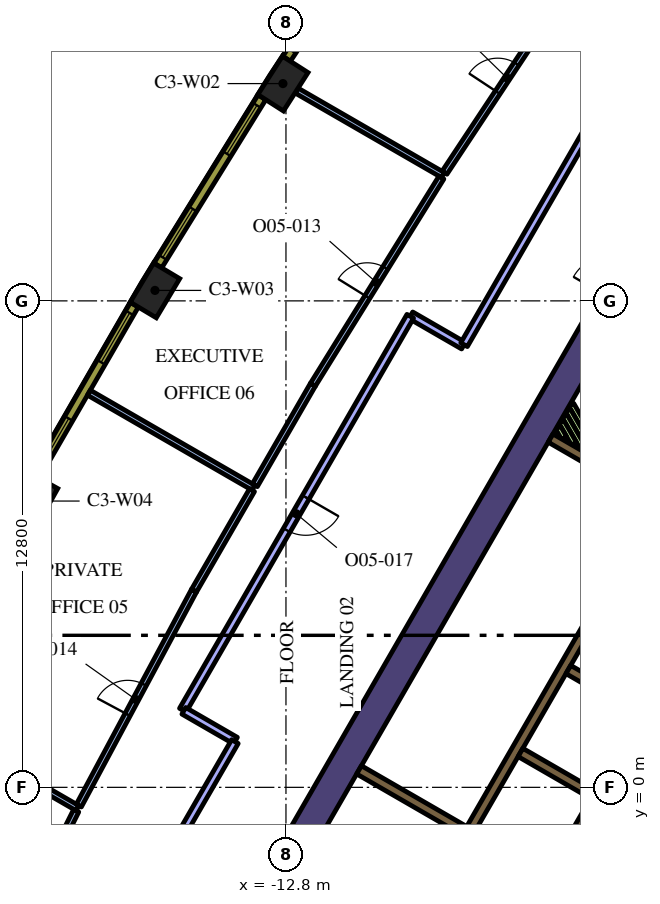
"""IFC4 building model, lengths in metres.
Left out: names, types, materials, properties, quantities, classifications, styles, units other than length and angle.
Written with IfcOpenShell. Run it as: python <this file> out.ifc"""

import sys

from ifc_helpers import new_model, si_unit, direction, frame, frame_2d, origin, origin_2d, place, context, subcontext, project, spatial, rectangle, extrude, element, fill, save


model = new_model("IFC4")
c1 = context("Model", 3, precision=1e-05, world=origin(), true_north=direction((0.0, 1.0)))
c2 = subcontext(c1, "Body", "Model", "MODEL_VIEW")
j1 = project(units=[si_unit("LENGTHUNIT", "METRE"), si_unit("PLANEANGLEUNIT", "RADIAN")], contexts=[c1])
p1 = place(None, origin())
s1 = spatial("IfcSite", under=j1, at=p1, CompositionType="ELEMENT")
p2 = place(p1, origin())
s2 = spatial("IfcBuilding", under=s1, at=p2, CompositionType="ELEMENT")
p3 = place(p2, frame((0.0, 0.0, 192.0)))
s3 = spatial("IfcBuildingStorey", under=s2, at=p3, CompositionType="ELEMENT", Elevation=192.0)
for number, where, z_axis, x_axis in (
    (1, (-12.88, 18.517, 0.0), (0.0, 0.0, 1.0), (-0.539, -0.842, 0.0)),
    (2, (-16.247, 13.075, 0.0), (0.0, 0.0, 1.0), (-0.513, -0.858, 0.0)),
    (3, (-19.447, 7.533, 0.0), (0.0, 0.0, 1.0), (-0.487, -0.874, 0.0)),
):
    element("IfcColumn", number, at=place(p3, frame(where, z_axis=z_axis, x_axis=x_axis)), inside=s3, PredefinedType="COLUMN", context=c2, shape_type="SweptSolid", body=[
        extrude(rectangle(XDim=1.2, YDim=0.8, at=origin_2d()), origin(), (0.0, 0.0, 1.0), 4.2),
    ])
p4 = place(p3, frame((-4.321, 12.616, 0.0), z_axis=(0.0, 0.0, 1.0), x_axis=(-0.500009809857, -0.866019739987, 0.0)))
e4 = element("IfcWall", 4, at=p4, inside=s3, PredefinedType="SOLIDWALL", context=c2, shape_type="SweptSolid", body=[
    extrude(rectangle(XDim=16.695, YDim=0.8, at=frame_2d((8.347, 0.0))), origin(), (0.0, 0.0, 1.0), 4.2),
])
p5 = place(p3, frame((-3.02, 7.419, 0.0), z_axis=(0.0, 0.0, 1.0), x_axis=(-0.500022956343, -0.866012149528, 0.0)))
e5 = element("IfcWall", 5, at=p5, inside=s3, PredefinedType="SOLIDWALL", context=c2, shape_type="SweptSolid", body=[
    extrude(rectangle(XDim=10.08, YDim=0.25, at=frame_2d((5.04, 0.0))), origin(), (0.0, 0.0, 1.0), 4.2),
])
for number, where, z_axis, x_axis in (
    (6, (-5.369, 3.1, 0.0), (0.0, 0.0, 1.0), (0.866, -0.5, 0.0)),
    (7, (-4.724, -0.182, 0.0), (0.0, 0.0, 1.0), (-0.866, 0.5, 0.0)),
):
    element("IfcWall", number, at=place(p3, frame(where, z_axis=z_axis, x_axis=x_axis)), inside=s3, PredefinedType="SOLIDWALL", context=c2, shape_type="SweptSolid", body=[
        extrude(rectangle(XDim=2.2, YDim=0.25, at=frame_2d((1.1, 0.0))), origin(), (0.0, 0.0, 1.0), 4.2),
    ])
p6 = place(p3, frame((-8.106, -1.14, 0.0), z_axis=(0.0, 0.0, 1.0), x_axis=(-0.866008981251, 0.500028443584, 0.0)))
e8 = element("IfcWall", 8, at=p6, inside=s3, PredefinedType="SOLIDWALL", context=c2, shape_type="SweptSolid", body=[
    extrude(rectangle(XDim=3.2, YDim=0.25, at=frame_2d((1.6, 0.0))), origin(), (0.0, 0.0, 1.0), 4.2),
])
p7 = place(p3, frame((-5.837, 9.19, 0.0), z_axis=(0.0, 0.0, 1.0), x_axis=(0.866024298998, -0.500001913541, 0.0)))
e9 = element("IfcWall", 9, at=p7, inside=s3, PredefinedType="SOLIDWALL", context=c2, shape_type="SweptSolid", body=[
    extrude(rectangle(XDim=1.21, YDim=0.25, at=frame_2d((0.605, 0.0))), origin(), (0.0, 0.0, 1.0), 4.2),
])
p8 = place(p3, frame((-5.294, 10.067, 0.0), z_axis=(0.0, 0.0, 1.0), x_axis=(0.500054140411, -0.865994143547, 0.0)))
e10 = element("IfcWall", 10, at=p8, inside=s3, PredefinedType="PARTITIONING", context=c2, shape_type="SweptSolid", body=[
    extrude(rectangle(XDim=1.529, YDim=0.15, at=frame_2d((0.765, 0.0))), origin(), (0.0, 0.0, 1.0), 3.1),
])
p9 = place(p3, frame((-5.381, 9.917, 0.0), z_axis=(0.0, 0.0, 1.0), x_axis=(0.500136970483, -0.865946309396, 0.0)))
e11 = element("IfcWall", 11, at=p9, inside=s3, PredefinedType="PARTITIONING", context=c2, shape_type="SweptSolid", body=[
    extrude(rectangle(XDim=1.359, YDim=0.15, at=frame_2d((0.68, 0.0))), origin(), (0.0, 0.0, 1.0), 3.1),
])
p10 = place(p3, frame((-5.467, 9.767, 0.0), z_axis=(0.0, 0.0, 1.0), x_axis=(0.500168849293, -0.86592789665, 0.0)))
e12 = element("IfcWall", 12, at=p10, inside=s3, PredefinedType="PARTITIONING", context=c2, shape_type="SweptSolid", body=[
    extrude(rectangle(XDim=1.01, YDim=0.15, at=frame_2d((0.505, 0.0))), origin(), (0.0, 0.0, 1.0), 3.1),
])
p11 = place(p3, frame((-5.554, 9.617, 0.0), z_axis=(0.0, 0.0, 1.0), x_axis=(0.500253084543, -0.86587923604, 0.0)))
e13 = element("IfcWall", 13, at=p11, inside=s3, PredefinedType="PARTITIONING", context=c2, shape_type="SweptSolid", body=[
    extrude(rectangle(XDim=0.664, YDim=0.15, at=frame_2d((0.332, 0.0))), origin(), (0.0, 0.0, 1.0), 3.1),
])
p12 = place(p3, frame((-5.64, 9.467, 0.0), z_axis=(0.0, 0.0, 1.0), x_axis=(0.499944387978, -0.86605750902, 0.0)))
e14 = element("IfcWall", 14, at=p12, inside=s3, PredefinedType="PARTITIONING", context=c2, shape_type="SweptSolid", body=[
    extrude(rectangle(XDim=0.317, YDim=0.15, at=frame_2d((0.159, 0.0))), origin(), (0.0, 0.0, 1.0), 3.1),
])
p13 = place(p3, frame((-0.898, 6.194, 0.0), z_axis=(0.0, 0.0, 1.0), x_axis=(-0.499996202215, -0.866027596426, 0.0)))
e15 = element("IfcWall", 15, at=p13, inside=s3, PredefinedType="SOLIDWALL", context=c2, shape_type="SweptSolid", body=[
    extrude(rectangle(XDim=9.83, YDim=0.25, at=frame_2d((4.915, 0.0))), origin(), (0.0, 0.0, 1.0), 4.2),
])
p14 = place(p13, frame((0.585, 0.0, 0.0)))
e16 = element("IfcOpeningElement", 16, at=p14, cuts=e15, PredefinedType="OPENING", context=c2, shape_type="SweptSolid", body=[
    extrude(rectangle(XDim=1.1, YDim=2.1, at=frame_2d((0.55, 1.05))), frame((0.0, 0.135, 0.0), z_axis=(0.0, -1.0, 0.0), x_axis=(1.0, 0.0, 0.0)), (0.0, 0.0, 1.0), 0.27),
])
p15 = place(p13, frame((3.105, 0.0, 0.0)))
e17 = element("IfcOpeningElement", 17, at=p15, cuts=e15, PredefinedType="OPENING", context=c2, shape_type="SweptSolid", body=[
    extrude(rectangle(XDim=1.1, YDim=2.1, at=frame_2d((0.55, 1.05))), frame((0.0, 0.135, 0.0), z_axis=(0.0, -1.0, 0.0), x_axis=(1.0, 0.0, 0.0)), (0.0, 0.0, 1.0), 0.27),
])
p16 = place(p13, frame((5.625, 0.0, 0.0)))
e18 = element("IfcOpeningElement", 18, at=p16, cuts=e15, PredefinedType="OPENING", context=c2, shape_type="SweptSolid", body=[
    extrude(rectangle(XDim=1.1, YDim=2.1, at=frame_2d((0.55, 1.05))), frame((0.0, 0.135, 0.0), z_axis=(0.0, -1.0, 0.0), x_axis=(1.0, 0.0, 0.0)), (0.0, 0.0, 1.0), 0.27),
])
p17 = place(p13, frame((8.145, 0.0, 0.0)))
e19 = element("IfcOpeningElement", 19, at=p17, cuts=e15, PredefinedType="OPENING", context=c2, shape_type="SweptSolid", body=[
    extrude(rectangle(XDim=1.1, YDim=2.1, at=frame_2d((0.55, 1.05))), frame((0.0, 0.135, 0.0), z_axis=(0.0, -1.0, 0.0), x_axis=(1.0, 0.0, 0.0)), (0.0, 0.0, 1.0), 0.27),
])
p18 = place(p3, frame((-8.669, 16.11, 0.0), z_axis=(0.0, 0.0, 1.0), x_axis=(-0.866019272134, 0.50001062018, 0.0)))
e20 = element("IfcWall", 20, at=p18, inside=s3, PredefinedType="PARTITIONING", context=c2, shape_type="SweptSolid", body=[
    extrude(rectangle(XDim=4.449, YDim=0.15, at=frame_2d((2.225, 0.0))), origin(), (0.0, 0.0, 1.0), 3.1),
])
p19 = place(p3, frame((-8.627, 16.173, 0.0), z_axis=(0.0, 0.0, 1.0), x_axis=(0.551896352686, 0.833912714792, 0.0)))
e21 = element("IfcWall", 21, at=p19, inside=s3, PredefinedType="PARTITIONING", context=c2, shape_type="SweptSolid", body=[
    extrude(rectangle(XDim=5.934, YDim=0.15, at=frame_2d((2.967, 0.0))), origin(), (0.0, 0.0, 1.0), 3.1),
])
p20 = place(p19, frame((2.534, 0.0, 0.0)))
e22 = element("IfcOpeningElement", 22, at=p20, cuts=e21, PredefinedType="OPENING", context=c2, shape_type="SweptSolid", body=[
    extrude(rectangle(XDim=0.9, YDim=2.1, at=frame_2d((0.45, 1.05))), frame((0.0, 0.085, 0.0), z_axis=(0.0, -1.0, 0.0), x_axis=(1.0, 0.0, 0.0)), (0.0, 0.0, 1.0), 0.17),
])
p21 = place(p3, frame((-13.656, 7.884, 0.0), z_axis=(0.0, 0.0, 1.0), x_axis=(-0.866022959057, 0.500004234368, 0.0)))
e23 = element("IfcWall", 23, at=p21, inside=s3, PredefinedType="PARTITIONING", context=c2, shape_type="SweptSolid", body=[
    extrude(rectangle(XDim=5.0, YDim=0.15, at=frame_2d((2.5, 0.0))), origin(), (0.0, 0.0, 1.0), 3.1),
])
p22 = place(p3, frame((-12.093, 10.591, 0.0), z_axis=(0.0, 0.0, 1.0), x_axis=(0.527179193015, 0.849754140003, 0.0)))
e24 = element("IfcWall", 24, at=p22, inside=s3, PredefinedType="PARTITIONING", context=c2, shape_type="SweptSolid", body=[
    extrude(rectangle(XDim=6.42, YDim=0.15, at=frame_2d((3.21, 0.0))), origin(), (0.0, 0.0, 1.0), 3.1),
])
p23 = place(p22, frame((2.719, 0.0, 0.0)))
e25 = element("IfcOpeningElement", 25, at=p23, cuts=e24, PredefinedType="OPENING", context=c2, shape_type="SweptSolid", body=[
    extrude(rectangle(XDim=0.9, YDim=2.1, at=frame_2d((0.45, 1.05))), frame((0.0, 0.085, 0.0), z_axis=(0.0, -1.0, 0.0), x_axis=(1.0, 0.0, 0.0)), (0.0, 0.0, 1.0), 0.17),
])
p24 = place(p3, frame((-12.093, 10.591, 0.0), z_axis=(0.0, 0.0, 1.0), x_axis=(-0.499994921628, -0.866028335764, 0.0)))
e26 = element("IfcWall", 26, at=p24, inside=s3, PredefinedType="PARTITIONING", context=c2, shape_type="SweptSolid", body=[
    extrude(rectangle(XDim=3.051, YDim=0.15, at=frame_2d((1.525, 0.0))), origin(), (0.0, 0.0, 1.0), 3.1),
])
p25 = place(p3, frame((-18.286, -0.547, 0.0), z_axis=(0.0, 0.0, 1.0), x_axis=(-0.866043033223, 0.499969463673, 0.0)))
e27 = element("IfcWall", 27, at=p25, inside=s3, PredefinedType="PARTITIONING", context=c2, shape_type="SweptSolid", body=[
    extrude(rectangle(XDim=4.449, YDim=0.15, at=frame_2d((2.225, 0.0))), origin(), (0.0, 0.0, 1.0), 3.1),
])
p26 = place(p3, frame((-13.693, 7.819, 0.0), z_axis=(0.0, 0.0, 1.0), x_axis=(-0.500054937028, -0.865993683553, 0.0)))
e28 = element("IfcWall", 28, at=p26, inside=s3, PredefinedType="PARTITIONING", context=c2, shape_type="SweptSolid", body=[
    extrude(rectangle(XDim=3.051, YDim=0.15, at=frame_2d((1.525, 0.0))), origin(), (0.0, 0.0, 1.0), 3.1),
])
p27 = place(p3, frame((-18.251, -0.481, 0.0), z_axis=(0.0, 0.0, 1.0), x_axis=(0.472318506028, 0.881427948765, 0.0)))
e29 = element("IfcWall", 29, at=p27, inside=s3, PredefinedType="PARTITIONING", context=c2, shape_type="SweptSolid", body=[
    extrude(rectangle(XDim=6.419, YDim=0.15, at=frame_2d((3.21, 0.0))), origin(), (0.0, 0.0, 1.0), 3.1),
])
p28 = place(p27, frame((2.719, 0.0, 0.0)))
e30 = element("IfcOpeningElement", 30, at=p28, cuts=e29, PredefinedType="OPENING", context=c2, shape_type="SweptSolid", body=[
    extrude(rectangle(XDim=0.9, YDim=2.1, at=frame_2d((0.45, 1.05))), frame((0.0, 0.085, 0.0), z_axis=(0.0, -1.0, 0.0), x_axis=(1.0, 0.0, 0.0)), (0.0, 0.0, 1.0), 0.17),
])
p29 = place(p3, frame((-20.968, -5.925, 0.0), z_axis=(0.0, 0.0, 1.0), x_axis=(0.446258864447, 0.894903919928, 0.0)))
e31 = element("IfcWall", 31, at=p29, inside=s3, PredefinedType="PARTITIONING", context=c2, shape_type="SweptSolid", body=[
    extrude(rectangle(XDim=5.934, YDim=0.15, at=frame_2d((2.967, 0.0))), origin(), (0.0, 0.0, 1.0), 3.1),
])
p30 = place(p29, frame((2.534, 0.0, 0.0)))
e32 = element("IfcOpeningElement", 32, at=p30, cuts=e31, PredefinedType="OPENING", context=c2, shape_type="SweptSolid", body=[
    extrude(rectangle(XDim=0.9, YDim=2.1, at=frame_2d((0.45, 1.05))), frame((0.0, 0.085, 0.0), z_axis=(0.0, -1.0, 0.0), x_axis=(1.0, 0.0, 0.0)), (0.0, 0.0, 1.0), 0.17),
])
p31 = place(p3, frame((-8.128, 11.621, 0.0), z_axis=(0.0, 0.0, 1.0), x_axis=(-0.866028054938, 0.499995408039, 0.0)))
e33 = element("IfcWall", 33, at=p31, inside=s3, PredefinedType="PARTITIONING", context=c2, shape_type="SweptSolid", body=[
    extrude(rectangle(XDim=1.6, YDim=0.2, at=frame_2d((0.8, 0.0))), origin(), (0.0, 0.0, 1.0), 3.1),
])
p32 = place(p3, frame((-9.529, 12.395, 0.0), z_axis=(0.0, 0.0, 1.0), x_axis=(-0.500001991949, -0.866024253729, 0.0)))
e34 = element("IfcWall", 34, at=p32, inside=s3, PredefinedType="PARTITIONING", context=c2, shape_type="SweptSolid", body=[
    extrude(rectangle(XDim=11.97, YDim=0.2, at=frame_2d((5.985, 0.0))), origin(), (0.0, 0.0, 1.0), 3.1),
])
p33 = place(p32, frame((5.5, 0.0, 0.0)))
e35 = element("IfcOpeningElement", 35, at=p33, cuts=e34, PredefinedType="OPENING", context=c2, shape_type="SweptSolid", body=[
    extrude(rectangle(XDim=1.0, YDim=2.1, at=frame_2d((0.5, 1.05))), frame((0.0, 0.11, 0.0), z_axis=(0.0, -1.0, 0.0), x_axis=(1.0, 0.0, 0.0)), (0.0, 0.0, 1.0), 0.22),
])
p34 = place(p3, frame((-15.488, 2.014, 0.0), z_axis=(0.0, 0.0, 1.0), x_axis=(0.865975818674, -0.500085874098, 0.0)))
e36 = element("IfcWall", 36, at=p34, inside=s3, PredefinedType="PARTITIONING", context=c2, shape_type="SweptSolid", body=[
    extrude(rectangle(XDim=1.57, YDim=0.2, at=frame_2d((0.785, 0.0))), origin(), (0.0, 0.0, 1.0), 3.1),
])
p35 = place(p3, frame((-14.143, 1.203, 0.0), z_axis=(0.0, 0.0, 1.0), x_axis=(-0.500010806419, -0.866019164606, 0.0)))
e37 = element("IfcWall", 37, at=p35, inside=s3, PredefinedType="PARTITIONING", context=c2, shape_type="SweptSolid", body=[
    extrude(rectangle(XDim=8.721, YDim=0.2, at=frame_2d((4.361, 0.0))), origin(), (0.0, 0.0, 1.0), 3.1),
])
p36 = place(p3, frame((-3.768, 19.174, 0.0), z_axis=(0.0, 0.0, 1.0), x_axis=(-0.499985066967, -0.866034025203, 0.0)))
e38 = element("IfcWall", 38, at=p36, inside=s3, PredefinedType="PARTITIONING", context=c2, shape_type="SweptSolid", body=[
    extrude(rectangle(XDim=8.691, YDim=0.2, at=frame_2d((4.346, 0.0))), origin(), (0.0, 0.0, 1.0), 3.1),
])
p37 = place(p3, frame((-9.911, 23.51, 0.0), z_axis=(0.0, 0.0, 1.0), x_axis=(-0.551892811511, -0.833915058386, 0.0)))
e39 = element("IfcWall", 39, at=p37, inside=s3, PredefinedType="SOLIDWALL", context=c2, shape_type="SweptSolid", body=[
    extrude(rectangle(XDim=5.204, YDim=0.24, at=frame_2d((2.602, 0.0))), origin(), (0.0, 0.0, 1.0), 3.9),
])
p38 = place(p37, frame((0.248, 0.0, 0.9)))
e40 = element("IfcOpeningElement", 40, at=p38, cuts=e39, PredefinedType="OPENING", context=c2, shape_type="SweptSolid", body=[
    extrude(rectangle(XDim=1.5, YDim=2.55, at=frame_2d((0.75, 1.275))), frame((0.0, 0.13, 0.0), z_axis=(0.0, -1.0, 0.0), x_axis=(1.0, 0.0, 0.0)), (0.0, 0.0, 1.0), 0.26),
])
p39 = place(p37, frame((3.455, 0.0, 0.9)))
e41 = element("IfcOpeningElement", 41, at=p39, cuts=e39, PredefinedType="OPENING", context=c2, shape_type="SweptSolid", body=[
    extrude(rectangle(XDim=1.5, YDim=2.55, at=frame_2d((0.75, 1.275))), frame((0.0, 0.13, 0.0), z_axis=(0.0, -1.0, 0.0), x_axis=(1.0, 0.0, 0.0)), (0.0, 0.0, 1.0), 0.26),
])
p40 = place(p3, frame((-13.433, 18.156, 0.0), z_axis=(0.0, 0.0, 1.0), x_axis=(-0.526197926587, -0.850362124072, 0.0)))
e42 = element("IfcWall", 42, at=p40, inside=s3, PredefinedType="SOLIDWALL", context=c2, shape_type="SweptSolid", body=[
    extrude(rectangle(XDim=5.203, YDim=0.24, at=frame_2d((2.602, 0.0))), origin(), (0.0, 0.0, 1.0), 3.9),
])
p41 = place(p40, frame((0.248, 0.0, 0.9)))
e43 = element("IfcOpeningElement", 43, at=p41, cuts=e42, PredefinedType="OPENING", context=c2, shape_type="SweptSolid", body=[
    extrude(rectangle(XDim=1.5, YDim=2.55, at=frame_2d((0.75, 1.275))), frame((0.0, 0.13, 0.0), z_axis=(0.0, -1.0, 0.0), x_axis=(1.0, 0.0, 0.0)), (0.0, 0.0, 1.0), 0.26),
])
p42 = place(p40, frame((3.455, 0.0, 0.9)))
e44 = element("IfcOpeningElement", 44, at=p42, cuts=e42, PredefinedType="OPENING", context=c2, shape_type="SweptSolid", body=[
    extrude(rectangle(XDim=1.5, YDim=2.55, at=frame_2d((0.75, 1.275))), frame((0.0, 0.13, 0.0), z_axis=(0.0, -1.0, 0.0), x_axis=(1.0, 0.0, 0.0)), (0.0, 0.0, 1.0), 0.26),
])
p43 = place(p3, frame((-16.789, 12.697, 0.0), z_axis=(0.0, 0.0, 1.0), x_axis=(-0.500009456303, -0.866019944116, 0.0)))
e45 = element("IfcWall", 45, at=p43, inside=s3, PredefinedType="SOLIDWALL", context=c2, shape_type="SweptSolid", body=[
    extrude(rectangle(XDim=5.204, YDim=0.24, at=frame_2d((2.602, 0.0))), origin(), (0.0, 0.0, 1.0), 3.9),
])
p44 = place(p43, frame((0.248, 0.0, 0.9)))
e46 = element("IfcOpeningElement", 46, at=p44, cuts=e45, PredefinedType="OPENING", context=c2, shape_type="SweptSolid", body=[
    extrude(rectangle(XDim=1.5, YDim=2.55, at=frame_2d((0.75, 1.275))), frame((0.0, 0.13, 0.0), z_axis=(0.0, -1.0, 0.0), x_axis=(1.0, 0.0, 0.0)), (0.0, 0.0, 1.0), 0.26),
])
p45 = place(p43, frame((3.455, 0.0, 0.9)))
e47 = element("IfcOpeningElement", 47, at=p45, cuts=e45, PredefinedType="OPENING", context=c2, shape_type="SweptSolid", body=[
    extrude(rectangle(XDim=1.5, YDim=2.55, at=frame_2d((0.75, 1.275))), frame((0.0, 0.13, 0.0), z_axis=(0.0, -1.0, 0.0), x_axis=(1.0, 0.0, 0.0)), (0.0, 0.0, 1.0), 0.26),
])
p46 = place(p17, origin())
e48 = element("IfcDoor", 48, at=p46, inside=s3, OperationType="DOUBLE_DOOR_SLIDING", PredefinedType="DOOR", context=c2, shape_type="SweptSolid", body=[
    extrude(rectangle(XDim=1.1, YDim=2.1, at=frame_2d((0.55, 1.05))), frame((0.0, 0.025, 0.0), z_axis=(0.0, -1.0, 0.0), x_axis=(1.0, 0.0, 0.0)), (0.0, 0.0, 1.0), 0.05),
])
fill(e19, e48)
p47 = place(p20, origin())
e49 = element("IfcDoor", 49, at=p47, inside=s3, OperationType="SINGLE_SWING_RIGHT", PredefinedType="DOOR", context=c2, shape_type="SweptSolid", body=[
    extrude(rectangle(XDim=0.9, YDim=2.1, at=frame_2d((0.45, 1.05))), frame((0.0, 0.025, 0.0), z_axis=(0.0, -1.0, 0.0), x_axis=(1.0, 0.0, 0.0)), (0.0, 0.0, 1.0), 0.05),
])
fill(e22, e49)
p48 = place(p23, origin())
e50 = element("IfcDoor", 50, at=p48, inside=s3, OperationType="SINGLE_SWING_LEFT", PredefinedType="DOOR", context=c2, shape_type="SweptSolid", body=[
    extrude(rectangle(XDim=0.9, YDim=2.1, at=frame_2d((0.45, 1.05))), frame((0.0, 0.025, 0.0), z_axis=(0.0, -1.0, 0.0), x_axis=(1.0, 0.0, 0.0)), (0.0, 0.0, 1.0), 0.05),
])
fill(e25, e50)
p49 = place(p28, origin())
e51 = element("IfcDoor", 51, at=p49, inside=s3, OperationType="SINGLE_SWING_LEFT", PredefinedType="DOOR", context=c2, shape_type="SweptSolid", body=[
    extrude(rectangle(XDim=0.9, YDim=2.1, at=frame_2d((0.45, 1.05))), frame((0.0, 0.025, 0.0), z_axis=(0.0, -1.0, 0.0), x_axis=(1.0, 0.0, 0.0)), (0.0, 0.0, 1.0), 0.05),
])
fill(e30, e51)
p50 = place(p33, origin())
e52 = element("IfcDoor", 52, at=p50, inside=s3, OperationType="SINGLE_SWING_RIGHT", PredefinedType="DOOR", context=c2, shape_type="SweptSolid", body=[
    extrude(rectangle(XDim=1.0, YDim=2.1, at=frame_2d((0.5, 1.05))), frame((0.0, 0.025, 0.0), z_axis=(0.0, -1.0, 0.0), x_axis=(1.0, 0.0, 0.0)), (0.0, 0.0, 1.0), 0.05),
])
fill(e35, e52)
p51 = place(p41, origin())
e53 = element("IfcWindow", 53, at=p51, inside=s3, PartitioningType="SINGLE_PANEL", PredefinedType="WINDOW", context=c2, shape_type="SweptSolid", body=[
    extrude(rectangle(XDim=1.5, YDim=2.55, at=frame_2d((0.75, 1.275))), frame((0.0, 0.04, 0.0), z_axis=(0.0, -1.0, 0.0), x_axis=(1.0, 0.0, 0.0)), (0.0, 0.0, 1.0), 0.06),
])
fill(e43, e53)
p52 = place(p42, origin())
e54 = element("IfcWindow", 54, at=p52, inside=s3, PartitioningType="SINGLE_PANEL", PredefinedType="WINDOW", context=c2, shape_type="SweptSolid", body=[
    extrude(rectangle(XDim=1.5, YDim=2.55, at=frame_2d((0.75, 1.275))), frame((0.0, 0.04, 0.0), z_axis=(0.0, -1.0, 0.0), x_axis=(1.0, 0.0, 0.0)), (0.0, 0.0, 1.0), 0.06),
])
fill(e44, e54)
p53 = place(p44, origin())
e55 = element("IfcWindow", 55, at=p53, inside=s3, PartitioningType="SINGLE_PANEL", PredefinedType="WINDOW", context=c2, shape_type="SweptSolid", body=[
    extrude(rectangle(XDim=1.5, YDim=2.55, at=frame_2d((0.75, 1.275))), frame((0.0, 0.04, 0.0), z_axis=(0.0, -1.0, 0.0), x_axis=(1.0, 0.0, 0.0)), (0.0, 0.0, 1.0), 0.06),
])
fill(e46, e55)
p54 = place(p45, origin())
e56 = element("IfcWindow", 56, at=p54, inside=s3, PartitioningType="SINGLE_PANEL", PredefinedType="WINDOW", context=c2, shape_type="SweptSolid", body=[
    extrude(rectangle(XDim=1.5, YDim=2.55, at=frame_2d((0.75, 1.275))), frame((0.0, 0.04, 0.0), z_axis=(0.0, -1.0, 0.0), x_axis=(1.0, 0.0, 0.0)), (0.0, 0.0, 1.0), 0.06),
])
fill(e47, e56)
save(model, sys.argv[1])
